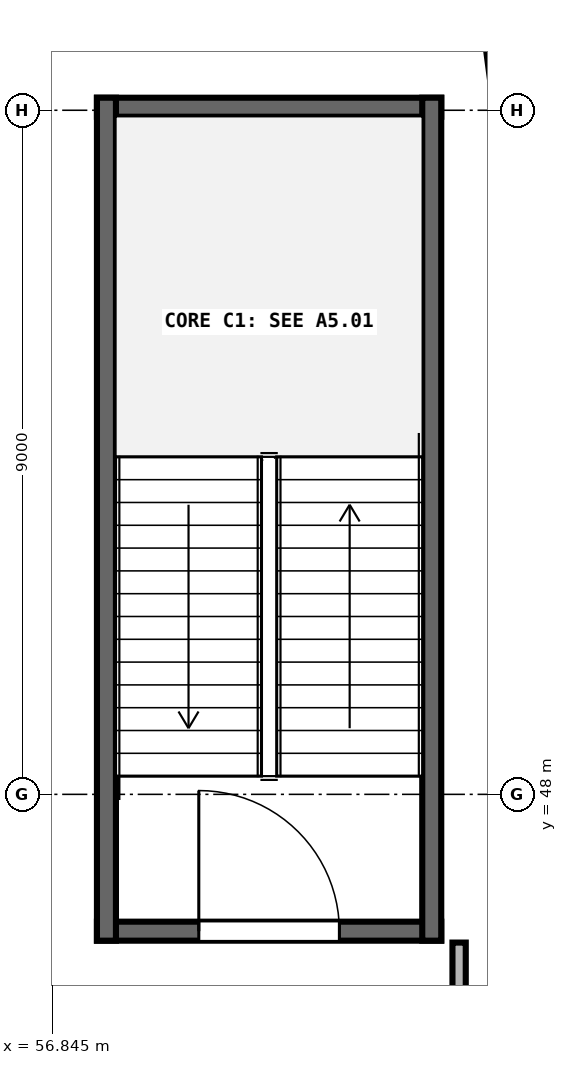
"""IFC4 building model, lengths in metres.
Left out: names, types, materials, properties, quantities, classifications, styles, units other than length and angle.
Written with IfcOpenShell. Run it as: python <this file> out.ifc"""

import sys

from ifc_helpers import new_model, si_unit, direction, frame, frame_2d, origin, place, context, subcontext, project, spatial, rectangle, extrude, element, fill, save


model = new_model("IFC4")
c1 = context("Model", 3, precision=1e-05, world=origin(), true_north=direction((0.0, 1.0)))
c2 = subcontext(c1, "Body", "Model", "MODEL_VIEW")
j1 = project(units=[si_unit("LENGTHUNIT", "METRE"), si_unit("PLANEANGLEUNIT", "RADIAN")], contexts=[c1])
p1 = place(None, origin())
s1 = spatial("IfcSite", under=j1, at=p1, CompositionType="ELEMENT")
p2 = place(p1, origin())
s2 = spatial("IfcBuilding", under=s1, at=p2, CompositionType="ELEMENT")
p3 = place(p2, origin())
s3 = spatial("IfcBuildingStorey", under=s2, at=p3, CompositionType="ELEMENT", Elevation=0.0)
p4 = place(p3, frame((62.4, 60.5, 0.0), z_axis=(0.0, 0.0, 1.0), x_axis=(0.130591512704, -0.99143625958, 0.0)))
e1 = element("IfcWall", 1, at=p4, inside=s3, PredefinedType="SHEAR", context=c2, shape_type="SweptSolid", body=[
    extrude(rectangle(XDim=5.117, YDim=0.4, at=frame_2d((2.558, 0.0))), origin(), (0.0, 0.0, 1.0), 5.12),
])
p5 = place(p3, frame((57.435, 46.2, 0.0), z_axis=(0.0, 0.0, 1.0), x_axis=(1.0, 0.0, 0.0)))
e2 = element("IfcWall", 2, at=p5, inside=s3, PredefinedType="SHEAR", context=c2, shape_type="SweptSolid", body=[
    extrude(rectangle(XDim=4.53, YDim=0.25, at=frame_2d((2.265, 0.0))), origin(), (0.0, 0.0, 1.0), 5.12),
])
p6 = place(p5, frame((1.34, 0.0, 0.0)))
e3 = element("IfcOpeningElement", 3, at=p6, cuts=e2, PredefinedType="OPENING", context=c2, shape_type="SweptSolid", body=[
    extrude(rectangle(XDim=1.85, YDim=2.25, at=frame_2d((0.925, 1.125))), frame((0.0, 0.135, 0.0), z_axis=(0.0, -1.0, 0.0), x_axis=(1.0, 0.0, 0.0)), (0.0, 0.0, 1.0), 0.27),
])
p7 = place(p3, frame((57.435, 57.04, 0.0), z_axis=(0.0, 0.0, 1.0), x_axis=(1.0, 0.0, 0.0)))
e4 = element("IfcWall", 4, at=p7, inside=s3, PredefinedType="SHEAR", context=c2, shape_type="SweptSolid", body=[
    extrude(rectangle(XDim=4.53, YDim=0.25, at=frame_2d((2.265, 0.0))), origin(), (0.0, 0.0, 1.0), 5.12),
])
for number, where, z_axis, x_axis in (
    (5, (57.56, 46.075, 0.0), (0.0, 0.0, 1.0), (0.0, 1.0, 0.0)),
    (6, (61.84, 46.075, 0.0), (0.0, 0.0, 1.0), (0.0, 1.0, 0.0)),
):
    element("IfcWall", number, at=place(p3, frame(where, z_axis=z_axis, x_axis=x_axis)), inside=s3, PredefinedType="SHEAR", context=c2, shape_type="SweptSolid", body=[
        extrude(rectangle(XDim=11.09, YDim=0.25, at=frame_2d((5.545, 0.0))), origin(), (0.0, 0.0, 1.0), 5.12),
    ])
p8 = place(p3, frame((62.2, 40.95, 0.0), z_axis=(0.0, 0.0, 1.0), x_axis=(0.0, 1.0, 0.0)))
e7 = element("IfcWall", 7, at=p8, inside=s3, PredefinedType="PARTITIONING", context=c2, shape_type="SweptSolid", body=[
    extrude(rectangle(XDim=5.1, YDim=0.175, at=frame_2d((2.55, 0.0))), origin(), (0.0, 0.0, 1.0), 5.07),
])
p9 = place(p8, frame((1.775, 0.0, 0.0)))
e8 = element("IfcOpeningElement", 8, at=p9, cuts=e7, PredefinedType="OPENING", context=c2, shape_type="SweptSolid", body=[
    extrude(rectangle(XDim=1.55, YDim=2.22, at=frame_2d((0.775, 1.11))), frame((0.0, 0.097, 0.0), z_axis=(0.0, -1.0, 0.0), x_axis=(1.0, 0.0, 0.0)), (0.0, 0.0, 1.0), 0.195),
])
p10 = place(p6, origin())
e9 = element("IfcDoor", 9, at=p10, inside=s3, OperationType="SINGLE_SWING_LEFT", PredefinedType="DOOR", context=c2, shape_type="SweptSolid", body=[
    extrude(rectangle(XDim=1.85, YDim=2.25, at=frame_2d((0.925, 1.125))), frame((0.0, 0.025, 0.0), z_axis=(0.0, -1.0, 0.0), x_axis=(1.0, 0.0, 0.0)), (0.0, 0.0, 1.0), 0.05),
])
fill(e3, e9)
save(model, sys.argv[1])
